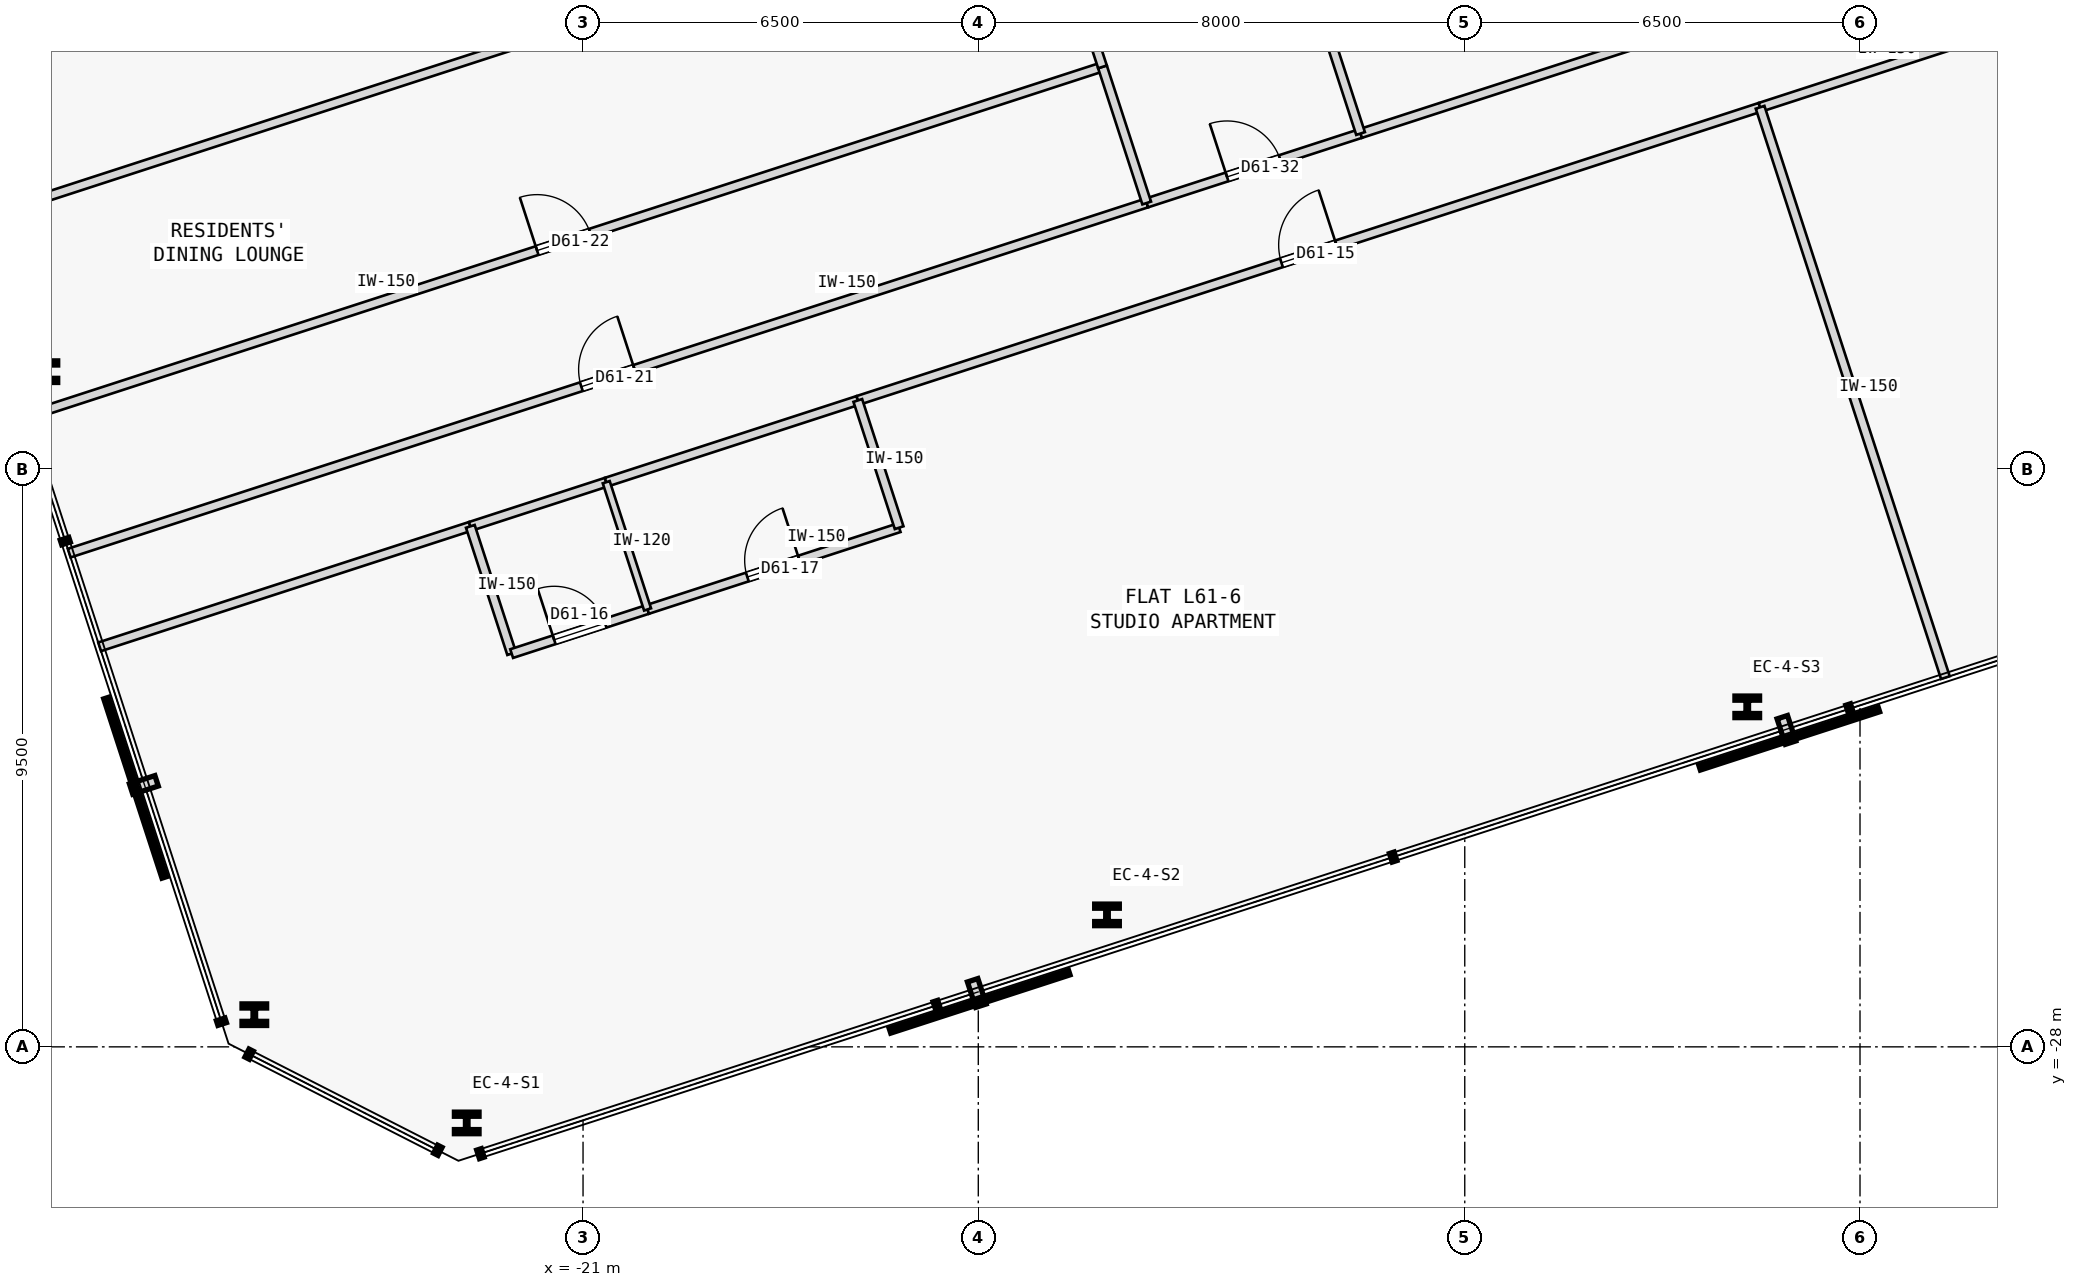
"""IFC4 building model, lengths in metres.
Left out: names, types, materials, properties, quantities, classifications, styles, units other than length and angle.
Written with IfcOpenShell. Run it as: python <this file> out.ifc"""

import sys

from ifc_helpers import new_model, si_unit, direction, frame, frame_2d, origin, origin_2d, place, context, subcontext, project, spatial, rectangle, i_section, extrude, element, fill, save


model = new_model("IFC4")
c1 = context("Model", 3, precision=1e-05, world=origin(), true_north=direction((0.0, 1.0)))
c2 = subcontext(c1, "Body", "Model", "MODEL_VIEW")
j1 = project(units=[si_unit("LENGTHUNIT", "METRE"), si_unit("PLANEANGLEUNIT", "RADIAN")], contexts=[c1])
p1 = place(None, origin())
s1 = spatial("IfcSite", under=j1, at=p1, CompositionType="ELEMENT")
p2 = place(p1, origin())
s2 = spatial("IfcBuilding", under=s1, at=p2, CompositionType="ELEMENT")
p3 = place(p2, frame((0.0, 0.0, 231.0)))
s3 = spatial("IfcBuildingStorey", under=s2, at=p3, CompositionType="ELEMENT", Elevation=231.0)
for number, where, z_axis, x_axis in (
    (1, (-22.913, -29.251, 0.0), (0.0, 0.0, 1.0), (1.0, 0.0, 0.0)),
    (2, (-12.384, -25.83, 0.0), (0.0, 0.0, 1.0), (1.0, 0.0, 0.0)),
    (3, (-1.854, -22.409, 0.0), (0.0, 0.0, 1.0), (1.0, 0.0, 0.0)),
    (4, (-29.842, -16.897, 0.0), (0.0, 0.0, 1.0), (1.0, 0.0, 0.0)),
    (5, (-26.406, -27.471, 0.0), (0.0, 0.0, 1.0), (1.0, 0.0, 0.0)),
):
    element("IfcColumn", number, at=place(p3, frame(where, z_axis=z_axis, x_axis=x_axis)), inside=s3, PredefinedType="COLUMN", context=c2, shape_type="SweptSolid", body=[
        extrude(i_section(OverallWidth=0.405, OverallDepth=0.355, WebThickness=0.042, FlangeThickness=0.068, FilletRadius=0.015, at=origin_2d()), origin(), (0.0, 0.0, 1.0), 3.35),
    ])
p4 = place(p3, frame((-28.95, -21.421, 0.0), z_axis=(0.0, 0.0, 1.0), x_axis=(0.951048062645, 0.309043010825, 0.0)))
e6 = element("IfcWall", 6, at=p4, inside=s3, PredefinedType="PARTITIONING", context=c2, shape_type="SweptSolid", body=[
    extrude(rectangle(XDim=6.41, YDim=0.15, at=frame_2d((3.205, 0.0))), origin(), (0.0, 0.0, 1.0), 3.125),
])
p5 = place(p3, frame((-16.482, -17.37, 0.0), z_axis=(0.0, 0.0, 1.0), x_axis=(0.9510563751, 0.309017428929, 0.0)))
e7 = element("IfcWall", 7, at=p5, inside=s3, PredefinedType="PARTITIONING", context=c2, shape_type="SweptSolid", body=[
    extrude(rectangle(XDim=15.602, YDim=0.15, at=frame_2d((7.801, 0.0))), origin(), (0.0, 0.0, 1.0), 3.125),
])
p6 = place(p5, frame((7.326, 0.0, 0.0)))
e8 = element("IfcOpeningElement", 8, at=p6, cuts=e7, PredefinedType="OPENING", context=c2, shape_type="SweptSolid", body=[
    extrude(rectangle(XDim=0.95, YDim=2.15, at=frame_2d((0.475, 1.075))), frame((0.0, 0.085, 0.0), z_axis=(0.0, -1.0, 0.0), x_axis=(1.0, 0.0, 0.0)), (0.0, 0.0, 1.0), 0.17),
])
p7 = place(p3, frame((-22.854, -19.44, 0.0), z_axis=(0.0, 0.0, 1.0), x_axis=(0.951076048914, 0.308956872689, 0.0)))
e9 = element("IfcWall", 9, at=p7, inside=s3, PredefinedType="PARTITIONING", context=c2, shape_type="SweptSolid", body=[
    extrude(rectangle(XDim=2.35, YDim=0.15, at=frame_2d((1.175, 0.0))), origin(), (0.0, 0.0, 1.0), 3.125),
])
p8 = place(p3, frame((-20.619, -18.714, 0.0), z_axis=(0.0, 0.0, 1.0), x_axis=(0.951052627573, 0.309028962374, 0.0)))
e10 = element("IfcWall", 10, at=p8, inside=s3, PredefinedType="PARTITIONING", context=c2, shape_type="SweptSolid", body=[
    extrude(rectangle(XDim=4.35, YDim=0.15, at=frame_2d((2.175, 0.0))), origin(), (0.0, 0.0, 1.0), 3.125),
])
p9 = place(p3, frame((-1.643, -12.549, 0.0), z_axis=(0.0, 0.0, 1.0), x_axis=(0.951058161173, 0.309011931914, 0.0)))
e11 = element("IfcWall", 11, at=p9, inside=s3, PredefinedType="PARTITIONING", context=c2, shape_type="SweptSolid", body=[
    extrude(rectangle(XDim=7.297, YDim=0.15, at=frame_2d((3.648, 0.0))), origin(), (0.0, 0.0, 1.0), 3.125),
])
p10 = place(p3, frame((-29.45, -19.881, 0.0), z_axis=(0.0, 0.0, 1.0), x_axis=(0.95105650271, 0.309017036186, 0.0)))
e12 = element("IfcWall", 12, at=p10, inside=s3, PredefinedType="PARTITIONING", context=c2, shape_type="SweptSolid", body=[
    extrude(rectangle(XDim=18.632, YDim=0.15, at=frame_2d((9.316, 0.0))), origin(), (0.0, 0.0, 1.0), 3.125),
])
p11 = place(p10, frame((8.856, 0.0, 0.0)))
e13 = element("IfcOpeningElement", 13, at=p11, cuts=e12, PredefinedType="OPENING", context=c2, shape_type="SweptSolid", body=[
    extrude(rectangle(XDim=0.92, YDim=2.15, at=frame_2d((0.46, 1.075))), frame((0.0, 0.085, 0.0), z_axis=(0.0, -1.0, 0.0), x_axis=(1.0, 0.0, 0.0)), (0.0, 0.0, 1.0), 0.17),
])
p12 = place(p3, frame((-11.73, -14.123, 0.0), z_axis=(0.0, 0.0, 1.0), x_axis=(0.951052502763, 0.309029346483, 0.0)))
e14 = element("IfcWall", 14, at=p12, inside=s3, PredefinedType="PARTITIONING", context=c2, shape_type="SweptSolid", body=[
    extrude(rectangle(XDim=3.698, YDim=0.15, at=frame_2d((1.849, 0.0))), origin(), (0.0, 0.0, 1.0), 3.125),
])
p13 = place(p12, frame((1.389, 0.0, 0.0)))
e15 = element("IfcOpeningElement", 15, at=p13, cuts=e14, PredefinedType="OPENING", context=c2, shape_type="SweptSolid", body=[
    extrude(rectangle(XDim=0.92, YDim=2.15, at=frame_2d((0.46, 1.075))), frame((0.0, 0.085, 0.0), z_axis=(0.0, -1.0, 0.0), x_axis=(1.0, 0.0, 0.0)), (0.0, 0.0, 1.0), 0.17),
])
p14 = place(p3, frame((-8.213, -12.98, 0.0), z_axis=(0.0, 0.0, 1.0), x_axis=(0.951058260096, 0.309011627456, 0.0)))
e16 = element("IfcWall", 16, at=p14, inside=s3, PredefinedType="PARTITIONING", context=c2, shape_type="SweptSolid", body=[
    extrude(rectangle(XDim=4.746, YDim=0.15, at=frame_2d((2.373, 0.0))), origin(), (0.0, 0.0, 1.0), 3.125),
])
p15 = place(p3, frame((-22.174, -21.533, 0.0), z_axis=(0.0, 0.0, 1.0), x_axis=(-0.309028364152, 0.951052821956, 0.0)))
e17 = element("IfcWall", 17, at=p15, inside=s3, PredefinedType="PARTITIONING", context=c2, shape_type="SweptSolid", body=[
    extrude(rectangle(XDim=2.2, YDim=0.15, at=frame_2d((1.1, 0.0))), origin(), (0.0, 0.0, 1.0), 3.125),
])
p16 = place(p3, frame((-22.174, -21.533, 0.0), z_axis=(0.0, 0.0, 1.0), x_axis=(0.951045519245, 0.309050837767, 0.0)))
e18 = element("IfcWall", 18, at=p16, inside=s3, PredefinedType="PARTITIONING", context=c2, shape_type="SweptSolid", body=[
    extrude(rectangle(XDim=2.35, YDim=0.15, at=frame_2d((1.175, 0.0))), origin(), (0.0, 0.0, 1.0), 3.125),
])
p17 = place(p16, frame((0.735, 0.0, 0.0)))
e19 = element("IfcOpeningElement", 19, at=p17, cuts=e18, PredefinedType="OPENING", context=c2, shape_type="SweptSolid", body=[
    extrude(rectangle(XDim=0.88, YDim=2.15, at=frame_2d((0.44, 1.075))), frame((0.0, 0.085, 0.0), z_axis=(0.0, -1.0, 0.0), x_axis=(1.0, 0.0, 0.0)), (0.0, 0.0, 1.0), 0.17),
])
p18 = place(p3, frame((-19.939, -20.807, 0.0), z_axis=(0.0, 0.0, 1.0), x_axis=(0.951052627573, 0.309028962374, 0.0)))
e20 = element("IfcWall", 20, at=p18, inside=s3, PredefinedType="PARTITIONING", context=c2, shape_type="SweptSolid", body=[
    extrude(rectangle(XDim=4.35, YDim=0.15, at=frame_2d((2.175, 0.0))), origin(), (0.0, 0.0, 1.0), 3.125),
])
p19 = place(p18, frame((1.725, 0.0, 0.0)))
e21 = element("IfcOpeningElement", 21, at=p19, cuts=e20, PredefinedType="OPENING", context=c2, shape_type="SweptSolid", body=[
    extrude(rectangle(XDim=0.9, YDim=2.15, at=frame_2d((0.45, 1.075))), frame((0.0, 0.085, 0.0), z_axis=(0.0, -1.0, 0.0), x_axis=(1.0, 0.0, 0.0)), (0.0, 0.0, 1.0), 0.17),
])
p20 = place(p3, frame((-15.802, -19.462, 0.0), z_axis=(0.0, 0.0, 1.0), x_axis=(-0.309060979314, 0.951042223598, 0.0)))
e22 = element("IfcWall", 22, at=p20, inside=s3, PredefinedType="PARTITIONING", context=c2, shape_type="SweptSolid", body=[
    extrude(rectangle(XDim=2.2, YDim=0.15, at=frame_2d((1.1, 0.0))), origin(), (0.0, 0.0, 1.0), 3.125),
])
p21 = place(p3, frame((1.404, -21.928, 0.0), z_axis=(0.0, 0.0, 1.0), x_axis=(-0.309022258842, 0.95105480575, 0.0)))
e23 = element("IfcWall", 23, at=p21, inside=s3, PredefinedType="PARTITIONING", context=c2, shape_type="SweptSolid", body=[
    extrude(rectangle(XDim=9.862, YDim=0.15, at=frame_2d((4.931, 0.0))), origin(), (0.0, 0.0, 1.0), 3.125),
])
p22 = place(p3, frame((-19.939, -20.807, 0.0), z_axis=(0.0, 0.0, 1.0), x_axis=(-0.309060979314, 0.951042223598, 0.0)))
e24 = element("IfcWall", 24, at=p22, inside=s3, PredefinedType="PARTITIONING", context=c2, shape_type="SweptSolid", body=[
    extrude(rectangle(XDim=2.2, YDim=0.12, at=frame_2d((1.1, 0.0))), origin(), (0.0, 0.0, 1.0), 3.125),
])
p23 = place(p3, frame((-30.178, -17.642, 0.0), z_axis=(0.0, 0.0, 1.0), x_axis=(0.95105650271, 0.309017036186, 0.0)))
e25 = element("IfcWall", 25, at=p23, inside=s3, PredefinedType="PARTITIONING", context=c2, shape_type="SweptSolid", body=[
    extrude(rectangle(XDim=18.632, YDim=0.15, at=frame_2d((9.316, 0.0))), origin(), (0.0, 0.0, 1.0), 3.125),
])
p24 = place(p23, frame((8.856, 0.0, 0.0)))
e26 = element("IfcOpeningElement", 26, at=p24, cuts=e25, PredefinedType="OPENING", context=c2, shape_type="SweptSolid", body=[
    extrude(rectangle(XDim=0.92, YDim=2.15, at=frame_2d((0.46, 1.075))), frame((0.0, 0.085, 0.0), z_axis=(0.0, -1.0, 0.0), x_axis=(1.0, 0.0, 0.0)), (0.0, 0.0, 1.0), 0.17),
])
p25 = place(p3, frame((-11.73, -14.123, 0.0), z_axis=(0.0, 0.0, 1.0), x_axis=(-0.309062621189, 0.951041690035, 0.0)))
e27 = element("IfcWall", 27, at=p25, inside=s3, PredefinedType="PARTITIONING", context=c2, shape_type="SweptSolid", body=[
    extrude(rectangle(XDim=2.354, YDim=0.15, at=frame_2d((1.177, 0.0))), origin(), (0.0, 0.0, 1.0), 3.125),
])
p26 = place(p3, frame((-31.208, -14.471, 0.0), z_axis=(0.0, 0.0, 1.0), x_axis=(0.951057753948, 0.309013185244, 0.0)))
e28 = element("IfcWall", 28, at=p26, inside=s3, PredefinedType="PARTITIONING", context=c2, shape_type="SweptSolid", body=[
    extrude(rectangle(XDim=18.632, YDim=0.15, at=frame_2d((9.316, 0.0))), origin(), (0.0, 0.0, 1.0), 3.125),
])
p27 = place(p3, frame((-12.458, -11.884, 0.0), z_axis=(0.0, 0.0, 1.0), x_axis=(-0.308946982245, 0.951079261766, 0.0)))
e29 = element("IfcWall", 29, at=p27, inside=s3, PredefinedType="PARTITIONING", context=c2, shape_type="SweptSolid", body=[
    extrude(rectangle(XDim=3.334, YDim=0.15, at=frame_2d((1.667, 0.0))), origin(), (0.0, 0.0, 1.0), 3.125),
])
p28 = place(p3, frame((-8.213, -12.98, 0.0), z_axis=(0.0, 0.0, 1.0), x_axis=(-0.309017065592, 0.951056493155, 0.0)))
e30 = element("IfcWall", 30, at=p28, inside=s3, PredefinedType="PARTITIONING", context=c2, shape_type="SweptSolid", body=[
    extrude(rectangle(XDim=7.76, YDim=0.15, at=frame_2d((3.88, 0.0))), origin(), (0.0, 0.0, 1.0), 3.125),
])
p29 = place(p6, origin())
e31 = element("IfcDoor", 31, at=p29, inside=s3, OperationType="SINGLE_SWING_RIGHT", PredefinedType="DOOR", context=c2, shape_type="SweptSolid", body=[
    extrude(rectangle(XDim=0.95, YDim=2.15, at=frame_2d((0.475, 1.075))), frame((0.0, 0.025, 0.0), z_axis=(0.0, -1.0, 0.0), x_axis=(1.0, 0.0, 0.0)), (0.0, 0.0, 1.0), 0.05),
])
fill(e8, e31)
p30 = place(p17, origin())
e32 = element("IfcDoor", 32, at=p30, inside=s3, OperationType="SINGLE_SWING_LEFT", PredefinedType="DOOR", context=c2, shape_type="SweptSolid", body=[
    extrude(rectangle(XDim=0.88, YDim=2.15, at=frame_2d((0.44, 1.075))), frame((0.0, 0.025, 0.0), z_axis=(0.0, -1.0, 0.0), x_axis=(1.0, 0.0, 0.0)), (0.0, 0.0, 1.0), 0.05),
])
fill(e19, e32)
p31 = place(p19, origin())
e33 = element("IfcDoor", 33, at=p31, inside=s3, OperationType="SINGLE_SWING_RIGHT", PredefinedType="DOOR", context=c2, shape_type="SweptSolid", body=[
    extrude(rectangle(XDim=0.9, YDim=2.15, at=frame_2d((0.45, 1.075))), frame((0.0, 0.025, 0.0), z_axis=(0.0, -1.0, 0.0), x_axis=(1.0, 0.0, 0.0)), (0.0, 0.0, 1.0), 0.05),
])
fill(e21, e33)
p32 = place(p11, origin())
e34 = element("IfcDoor", 34, at=p32, inside=s3, OperationType="SINGLE_SWING_RIGHT", PredefinedType="DOOR", context=c2, shape_type="SweptSolid", body=[
    extrude(rectangle(XDim=0.92, YDim=2.15, at=frame_2d((0.46, 1.075))), frame((0.0, 0.025, 0.0), z_axis=(0.0, -1.0, 0.0), x_axis=(1.0, 0.0, 0.0)), (0.0, 0.0, 1.0), 0.05),
])
fill(e13, e34)
p33 = place(p24, origin())
e35 = element("IfcDoor", 35, at=p33, inside=s3, OperationType="SINGLE_SWING_LEFT", PredefinedType="DOOR", context=c2, shape_type="SweptSolid", body=[
    extrude(rectangle(XDim=0.92, YDim=2.15, at=frame_2d((0.46, 1.075))), frame((0.0, 0.025, 0.0), z_axis=(0.0, -1.0, 0.0), x_axis=(1.0, 0.0, 0.0)), (0.0, 0.0, 1.0), 0.05),
])
fill(e26, e35)
p34 = place(p13, origin())
e36 = element("IfcDoor", 36, at=p34, inside=s3, OperationType="SINGLE_SWING_LEFT", PredefinedType="DOOR", context=c2, shape_type="SweptSolid", body=[
    extrude(rectangle(XDim=0.92, YDim=2.15, at=frame_2d((0.46, 1.075))), frame((0.0, 0.025, 0.0), z_axis=(0.0, -1.0, 0.0), x_axis=(1.0, 0.0, 0.0)), (0.0, 0.0, 1.0), 0.05),
])
fill(e15, e36)
save(model, sys.argv[1])
